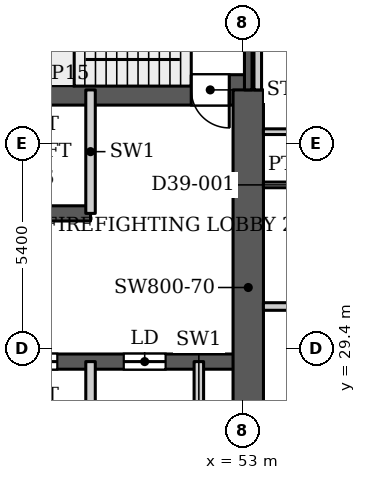
"""IFC4 building model, lengths in metres.
Left out: names, types, materials, properties, quantities, classifications, styles, units other than length and angle.
Written with IfcOpenShell. Run it as: python <this file> out.ifc"""

import sys

from ifc_helpers import new_model, si_unit, direction, frame, frame_2d, origin, place, context, subcontext, project, spatial, rectangle, extrude, source, transform, mapped, element, fill, save


model = new_model("IFC4")
c1 = context("Model", 3, precision=1e-05, world=origin(), true_north=direction((0.0, 1.0)))
c2 = subcontext(c1, "Body", "Model", "MODEL_VIEW")
j1 = project(units=[si_unit("LENGTHUNIT", "METRE"), si_unit("PLANEANGLEUNIT", "RADIAN")], contexts=[c1])
p1 = place(None, origin())
s1 = spatial("IfcSite", under=j1, at=p1, CompositionType="ELEMENT")
p2 = place(p1, origin())
s2 = spatial("IfcBuilding", under=s1, at=p2, CompositionType="ELEMENT")
p3 = place(p2, frame((0.0, 0.0, 168.2)))
s3 = spatial("IfcBuildingStorey", under=s2, at=p3, CompositionType="ELEMENT", Elevation=168.2)
p4 = place(p3, frame((34.75, 29.05, 0.0), z_axis=(0.0, 0.0, 1.0), x_axis=(1.0, 0.0, 0.0)))
e1 = element("IfcWall", 1, at=p4, inside=s3, PredefinedType="SHEAR", context=c2, shape_type="SweptSolid", body=[
    extrude(rectangle(XDim=18.4, YDim=0.4, at=frame_2d((9.2, 0.0))), origin(), (0.0, 0.0, 1.0), 3.9),
])
p5 = place(p4, frame((0.875, 0.0, 0.0)))
e2 = element("IfcOpeningElement", 2, at=p5, cuts=e1, PredefinedType="OPENING", context=c2, shape_type="SweptSolid", body=[
    extrude(rectangle(XDim=1.1, YDim=2.2, at=frame_2d((0.55, 1.1))), frame((0.0, 0.21, 0.0), z_axis=(0.0, -1.0, 0.0), x_axis=(1.0, 0.0, 0.0)), (0.0, 0.0, 1.0), 0.42),
])
p6 = place(p4, frame((3.725, 0.0, 0.0)))
e3 = element("IfcOpeningElement", 3, at=p6, cuts=e1, PredefinedType="OPENING", context=c2, shape_type="SweptSolid", body=[
    extrude(rectangle(XDim=1.1, YDim=2.2, at=frame_2d((0.55, 1.1))), frame((0.0, 0.21, 0.0), z_axis=(0.0, -1.0, 0.0), x_axis=(1.0, 0.0, 0.0)), (0.0, 0.0, 1.0), 0.42),
])
p7 = place(p4, frame((6.575, 0.0, 0.0)))
e4 = element("IfcOpeningElement", 4, at=p7, cuts=e1, PredefinedType="OPENING", context=c2, shape_type="SweptSolid", body=[
    extrude(rectangle(XDim=1.1, YDim=2.2, at=frame_2d((0.55, 1.1))), frame((0.0, 0.21, 0.0), z_axis=(0.0, -1.0, 0.0), x_axis=(1.0, 0.0, 0.0)), (0.0, 0.0, 1.0), 0.42),
])
p8 = place(p4, frame((9.425, 0.0, 0.0)))
e5 = element("IfcOpeningElement", 5, at=p8, cuts=e1, PredefinedType="OPENING", context=c2, shape_type="SweptSolid", body=[
    extrude(rectangle(XDim=1.1, YDim=2.2, at=frame_2d((0.55, 1.1))), frame((0.0, 0.21, 0.0), z_axis=(0.0, -1.0, 0.0), x_axis=(1.0, 0.0, 0.0)), (0.0, 0.0, 1.0), 0.42),
])
p9 = place(p4, frame((12.275, 0.0, 0.0)))
e6 = element("IfcOpeningElement", 6, at=p9, cuts=e1, PredefinedType="OPENING", context=c2, shape_type="SweptSolid", body=[
    extrude(rectangle(XDim=1.1, YDim=2.2, at=frame_2d((0.55, 1.1))), frame((0.0, 0.21, 0.0), z_axis=(0.0, -1.0, 0.0), x_axis=(1.0, 0.0, 0.0)), (0.0, 0.0, 1.0), 0.42),
])
p10 = place(p4, frame((15.125, 0.0, 0.0)))
e7 = element("IfcOpeningElement", 7, at=p10, cuts=e1, PredefinedType="OPENING", context=c2, shape_type="SweptSolid", body=[
    extrude(rectangle(XDim=1.1, YDim=2.2, at=frame_2d((0.55, 1.1))), frame((0.0, 0.21, 0.0), z_axis=(0.0, -1.0, 0.0), x_axis=(1.0, 0.0, 0.0)), (0.0, 0.0, 1.0), 0.42),
])
p11 = place(p3, frame((34.75, 32.95, 0.0), z_axis=(0.0, 0.0, 1.0), x_axis=(1.0, 0.0, 0.0)))
e8 = element("IfcWall", 8, at=p11, inside=s3, PredefinedType="SHEAR", context=c2, shape_type="SweptSolid", body=[
    extrude(rectangle(XDim=14.25, YDim=0.4, at=frame_2d((7.125, 0.0))), origin(), (0.0, 0.0, 1.0), 3.9),
])
p12 = place(p3, frame((34.75, 36.2, 0.0), z_axis=(0.0, 0.0, 1.0), x_axis=(1.0, 0.0, 0.0)))
e9 = element("IfcWall", 9, at=p12, inside=s3, PredefinedType="SHEAR", context=c2, shape_type="SweptSolid", body=[
    extrude(rectangle(XDim=18.4, YDim=0.8, at=frame_2d((9.2, 0.0))), origin(), (0.0, 0.0, 1.0), 3.9),
])
p13 = place(p12, frame((16.9, 0.0, 0.0)))
e10 = element("IfcOpeningElement", 10, at=p13, cuts=e9, PredefinedType="OPENING", context=c2, shape_type="SweptSolid", body=[
    extrude(rectangle(XDim=1.0, YDim=2.2, at=frame_2d((0.5, 1.1))), frame((0.0, 0.41, 0.0), z_axis=(0.0, -1.0, 0.0), x_axis=(1.0, 0.0, 0.0)), (0.0, 0.0, 1.0), 0.82),
])
p14 = place(p3, frame((53.15, 25.8, 0.0), z_axis=(0.0, 0.0, 1.0), x_axis=(0.0, 1.0, 0.0)))
e11 = element("IfcWall", 11, at=p14, inside=s3, PredefinedType="SHEAR", context=c2, shape_type="SweptSolid", body=[
    extrude(rectangle(XDim=10.4, YDim=0.8, at=frame_2d((5.2, 0.0))), origin(), (0.0, 0.0, 1.0), 3.9),
])
p15 = place(p3, frame((53.15, 36.2, 0.0), z_axis=(0.0, 0.0, 1.0), x_axis=(0.0, 1.0, 0.0)))
e12 = element("IfcWall", 12, at=p15, inside=s3, PredefinedType="SHEAR", context=c2, shape_type="SweptSolid", body=[
    extrude(rectangle(XDim=3.15, YDim=0.2, at=frame_2d((1.575, 0.0))), origin(), (0.0, 0.0, 1.0), 3.9),
])
for number, where, z_axis, x_axis in (
    (13, (49.0, 25.8, 0.0), (0.0, 0.0, 1.0), (0.0, 1.0, 0.0)),
    (14, (49.0, 32.95, 0.0), (0.0, 0.0, 1.0), (0.0, 1.0, 0.0)),
    (15, (51.85, 25.8, 0.0), (0.0, 0.0, 1.0), (0.0, 1.0, 0.0)),
):
    element("IfcWall", number, at=place(p3, frame(where, z_axis=z_axis, x_axis=x_axis)), inside=s3, PredefinedType="PARTITIONING", context=c2, shape_type="SweptSolid", body=[
        extrude(rectangle(XDim=3.25, YDim=0.25, at=frame_2d((1.625, 0.0))), origin(), (0.0, 0.0, 1.0), 3.9),
    ])
p16 = place(p3, frame((53.4, 36.199, 0.0), z_axis=(0.0, 0.0, 1.0), x_axis=(0.0, 1.0, 0.0)))
e16 = element("IfcWall", 16, at=p16, inside=s3, PredefinedType="PARTITIONING", context=c2, shape_type="SweptSolid", body=[
    extrude(rectangle(XDim=7.701, YDim=0.2, at=frame_2d((3.851, 0.0))), origin(), (0.0, 0.0, 1.0), 3.6),
])
p17 = place(p3, frame((53.549, 30.5, 0.0), z_axis=(0.0, 0.0, 1.0), x_axis=(1.0, 0.0, 0.0)))
e17 = element("IfcWall", 17, at=p17, inside=s3, PredefinedType="PARTITIONING", context=c2, shape_type="SweptSolid", body=[
    extrude(rectangle(XDim=39.151, YDim=0.2, at=frame_2d((19.575, 0.0))), origin(), (0.0, 0.0, 1.0), 3.6),
])
p18 = place(p17, frame((2.801, 0.0, 0.0)))
e18 = element("IfcOpeningElement", 18, at=p18, cuts=e17, PredefinedType="OPENING", context=c2, shape_type="SweptSolid", body=[
    extrude(rectangle(XDim=1.0, YDim=2.1, at=frame_2d((0.5, 1.05))), frame((0.0, 0.11, 0.0), z_axis=(0.0, -1.0, 0.0), x_axis=(1.0, 0.0, 0.0)), (0.0, 0.0, 1.0), 0.22),
])
p19 = place(p17, frame((9.851, 0.0, 0.0)))
e19 = element("IfcOpeningElement", 19, at=p19, cuts=e17, PredefinedType="OPENING", context=c2, shape_type="SweptSolid", body=[
    extrude(rectangle(XDim=1.0, YDim=2.1, at=frame_2d((0.5, 1.05))), frame((0.0, 0.11, 0.0), z_axis=(0.0, -1.0, 0.0), x_axis=(1.0, 0.0, 0.0)), (0.0, 0.0, 1.0), 0.22),
])
p20 = place(p17, frame((28.751, 0.0, 0.0)))
e20 = element("IfcOpeningElement", 20, at=p20, cuts=e17, PredefinedType="OPENING", context=c2, shape_type="SweptSolid", body=[
    extrude(rectangle(XDim=1.0, YDim=2.1, at=frame_2d((0.5, 1.05))), frame((0.0, 0.11, 0.0), z_axis=(0.0, -1.0, 0.0), x_axis=(1.0, 0.0, 0.0)), (0.0, 0.0, 1.0), 0.22),
])
p21 = place(p17, frame((32.651, 0.0, 0.0)))
e21 = element("IfcOpeningElement", 21, at=p21, cuts=e17, PredefinedType="OPENING", context=c2, shape_type="SweptSolid", body=[
    extrude(rectangle(XDim=1.0, YDim=2.1, at=frame_2d((0.5, 1.05))), frame((0.0, 0.11, 0.0), z_axis=(0.0, -1.0, 0.0), x_axis=(1.0, 0.0, 0.0)), (0.0, 0.0, 1.0), 0.22),
])
p22 = place(p3, frame((53.549, 33.7, 0.0), z_axis=(0.0, 0.0, 1.0), x_axis=(1.0, 0.0, 0.0)))
e22 = element("IfcWall", 22, at=p22, inside=s3, PredefinedType="PARTITIONING", context=c2, shape_type="SweptSolid", body=[
    extrude(rectangle(XDim=2.176, YDim=0.15, at=frame_2d((1.088, 0.0))), origin(), (0.0, 0.0, 1.0), 3.6),
])
p23 = place(p22, frame((0.651, 0.0, 0.0)))
e23 = element("IfcOpeningElement", 23, at=p23, cuts=e22, PredefinedType="OPENING", context=c2, shape_type="SweptSolid", body=[
    extrude(rectangle(XDim=0.8, YDim=2.1, at=frame_2d((0.4, 1.05))), frame((0.0, 0.085, 0.0), z_axis=(0.0, -1.0, 0.0), x_axis=(1.0, 0.0, 0.0)), (0.0, 0.0, 1.0), 0.17),
])
p24 = place(p3, frame((53.549, 35.1, 0.0), z_axis=(0.0, 0.0, 1.0), x_axis=(1.0, 0.0, 0.0)))
e24 = element("IfcWall", 24, at=p24, inside=s3, PredefinedType="PARTITIONING", context=c2, shape_type="SweptSolid", body=[
    extrude(rectangle(XDim=9.351, YDim=0.15, at=frame_2d((4.675, 0.0))), origin(), (0.0, 0.0, 1.0), 3.6),
])
p25 = place(p24, frame((7.351, 0.0, 0.0)))
e25 = element("IfcOpeningElement", 25, at=p25, cuts=e24, PredefinedType="OPENING", context=c2, shape_type="SweptSolid", body=[
    extrude(rectangle(XDim=0.9, YDim=2.1, at=frame_2d((0.45, 1.05))), frame((0.0, 0.085, 0.0), z_axis=(0.0, -1.0, 0.0), x_axis=(1.0, 0.0, 0.0)), (0.0, 0.0, 1.0), 0.17),
])
p26 = place(p24, frame((2.501, 0.0, 0.0)))
e26 = element("IfcOpeningElement", 26, at=p26, cuts=e24, PredefinedType="OPENING", context=c2, shape_type="SweptSolid", body=[
    extrude(rectangle(XDim=1.0, YDim=2.1, at=frame_2d((0.5, 1.05))), frame((0.0, 0.085, 0.0), z_axis=(0.0, -1.0, 0.0), x_axis=(1.0, 0.0, 0.0)), (0.0, 0.0, 1.0), 0.17),
])
m1 = source(origin(), c2, "Body", "SweptSolid", [
    extrude(rectangle(XDim=1.1, YDim=2.2, at=frame_2d((0.55, 1.1))), frame((0.0, 0.025, 0.0), z_axis=(0.0, -1.0, 0.0), x_axis=(1.0, 0.0, 0.0)), (0.0, 0.0, 1.0), 0.05),
])
p27 = place(p9, origin())
e27 = element("IfcDoor", 27, at=p27, inside=s3, OperationType="SLIDING_TO_LEFT", PredefinedType="DOOR", context=c2, shape_type="MappedRepresentation", body=[
    mapped(m1, transform((0.0, 0.0, 0.0), x_axis=(1.0, 0.0, 0.0), y_axis=(0.0, 1.0, 0.0), z_axis=(0.0, 0.0, 1.0), scale=1.0)),
])
fill(e6, e27)
p28 = place(p10, origin())
e28 = element("IfcDoor", 28, at=p28, inside=s3, OperationType="SLIDING_TO_LEFT", PredefinedType="DOOR", context=c2, shape_type="MappedRepresentation", body=[
    mapped(m1, transform((0.0, 0.0, 0.0), x_axis=(1.0, 0.0, 0.0), y_axis=(0.0, 1.0, 0.0), z_axis=(0.0, 0.0, 1.0), scale=1.0)),
])
fill(e7, e28)
m2 = source(origin(), c2, "Body", "SweptSolid", [
    extrude(rectangle(XDim=1.0, YDim=2.2, at=frame_2d((0.5, 1.1))), frame((0.0, 0.025, 0.0), z_axis=(0.0, -1.0, 0.0), x_axis=(1.0, 0.0, 0.0)), (0.0, 0.0, 1.0), 0.05),
])
p29 = place(p13, origin())
e29 = element("IfcDoor", 29, at=p29, inside=s3, OperationType="SINGLE_SWING_RIGHT", PredefinedType="DOOR", context=c2, shape_type="MappedRepresentation", body=[
    mapped(m2, transform((0.0, 0.0, 0.0), x_axis=(1.0, 0.0, 0.0), y_axis=(0.0, 1.0, 0.0), z_axis=(0.0, 0.0, 1.0), scale=1.0)),
])
fill(e10, e29)
save(model, sys.argv[1])
